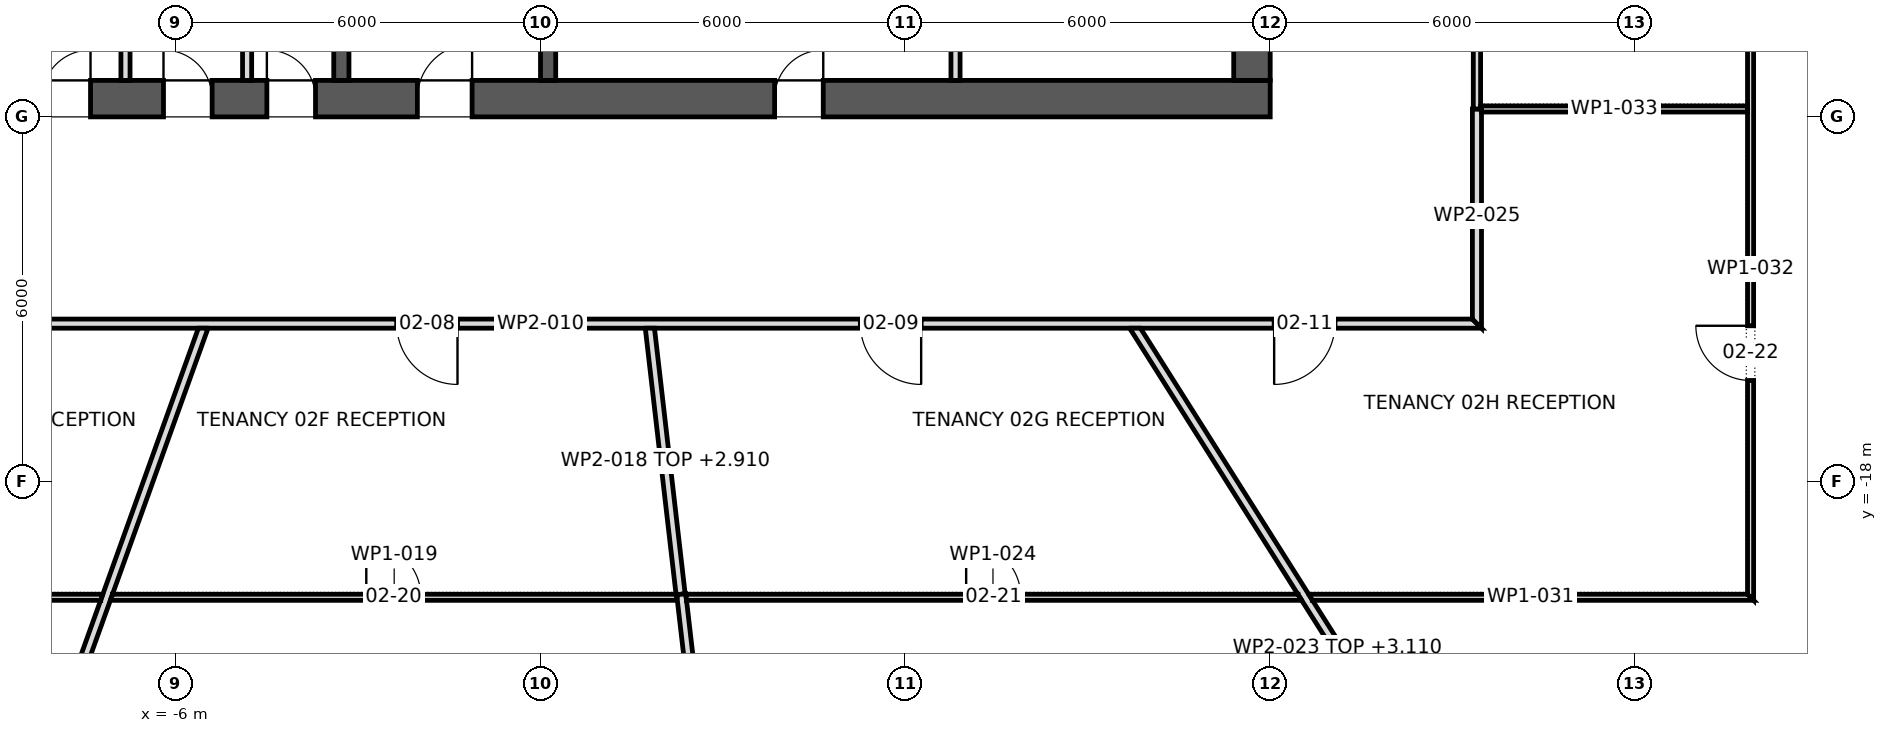
"""IFC4 building model, lengths in metres.
Left out: names, types, materials, properties, quantities, classifications, styles, units other than length and angle.
Written with IfcOpenShell. Run it as: python <this file> out.ifc"""

import sys

from ifc_helpers import new_model, si_unit, direction, frame, frame_2d, origin, place, context, subcontext, project, spatial, polyline, rectangle, outline, extrude, element, fill, save


model = new_model("IFC4")
c1 = context("Model", 3, precision=1e-05, world=origin(), true_north=direction((0.0, 1.0)))
c2 = subcontext(c1, "Body", "Model", "MODEL_VIEW")
j1 = project(units=[si_unit("LENGTHUNIT", "METRE"), si_unit("PLANEANGLEUNIT", "RADIAN")], contexts=[c1])
p1 = place(None, origin())
s1 = spatial("IfcSite", under=j1, at=p1, CompositionType="ELEMENT")
p2 = place(p1, origin())
s2 = spatial("IfcBuilding", under=s1, at=p2, CompositionType="ELEMENT")
p3 = place(p2, frame((0.0, 0.0, 36.1)))
s3 = spatial("IfcBuildingStorey", under=s2, at=p3, CompositionType="ELEMENT", Elevation=36.1)
p4 = place(p3, frame((-12.0, -11.7, 0.0), z_axis=(0.0, 0.0, 1.0), x_axis=(1.0, 0.0, 0.0)))
e1 = element("IfcWall", 1, at=p4, inside=s3, PredefinedType="SHEAR", context=c2, shape_type="SweptSolid", body=[
    extrude(rectangle(XDim=24.0, YDim=0.6, at=frame_2d((12.0, 0.0))), origin(), (0.0, 0.0, 1.0), 4.2),
])
p5 = place(p4, frame((9.975, 0.0, 0.0)))
e2 = element("IfcOpeningElement", 2, at=p5, cuts=e1, PredefinedType="OPENING", context=c2, shape_type="SweptSolid", body=[
    extrude(rectangle(XDim=0.9, YDim=2.1, at=frame_2d((0.45, 1.05))), frame((0.0, 0.312, 0.0), z_axis=(0.0, -1.0, 0.0), x_axis=(1.0, 0.0, 0.0)), (0.0, 0.0, 1.0), 0.624),
])
p6 = place(p4, frame((3.8, 0.0, 0.0)))
e3 = element("IfcOpeningElement", 3, at=p6, cuts=e1, PredefinedType="OPENING", context=c2, shape_type="SweptSolid", body=[
    extrude(rectangle(XDim=0.8, YDim=2.1, at=frame_2d((0.4, 1.05))), frame((0.0, 0.312, 0.0), z_axis=(0.0, -1.0, 0.0), x_axis=(1.0, 0.0, 0.0)), (0.0, 0.0, 1.0), 0.624),
])
p7 = place(p4, frame((5.8, 0.0, 0.0)))
e4 = element("IfcOpeningElement", 4, at=p7, cuts=e1, PredefinedType="OPENING", context=c2, shape_type="SweptSolid", body=[
    extrude(rectangle(XDim=0.8, YDim=2.1, at=frame_2d((0.4, 1.05))), frame((0.0, 0.312, 0.0), z_axis=(0.0, -1.0, 0.0), x_axis=(1.0, 0.0, 0.0)), (0.0, 0.0, 1.0), 0.624),
])
p8 = place(p4, frame((7.5, 0.0, 0.0)))
e5 = element("IfcOpeningElement", 5, at=p8, cuts=e1, PredefinedType="OPENING", context=c2, shape_type="SweptSolid", body=[
    extrude(rectangle(XDim=0.8, YDim=2.1, at=frame_2d((0.4, 1.05))), frame((0.0, 0.312, 0.0), z_axis=(0.0, -1.0, 0.0), x_axis=(1.0, 0.0, 0.0)), (0.0, 0.0, 1.0), 0.624),
])
p9 = place(p4, frame((15.85, 0.0, 0.0)))
e6 = element("IfcOpeningElement", 6, at=p9, cuts=e1, PredefinedType="OPENING", context=c2, shape_type="SweptSolid", body=[
    extrude(rectangle(XDim=0.8, YDim=2.1, at=frame_2d((0.4, 1.05))), frame((0.0, 0.312, 0.0), z_axis=(0.0, -1.0, 0.0), x_axis=(1.0, 0.0, 0.0)), (0.0, 0.0, 1.0), 0.624),
])
p10 = place(p3, frame((11.7, -11.4, 0.0), z_axis=(0.0, 0.0, 1.0), x_axis=(0.0, 1.0, 0.0)))
e7 = element("IfcWall", 7, at=p10, inside=s3, PredefinedType="SHEAR", context=c2, shape_type="SweptSolid", body=[
    extrude(rectangle(XDim=22.8, YDim=0.6, at=frame_2d((11.4, 0.0))), origin(), (0.0, 0.0, 1.0), 4.2),
])
p11 = place(p10, frame((10.2, 0.0, 0.0)))
e8 = element("IfcOpeningElement", 8, at=p11, cuts=e7, PredefinedType="OPENING", context=c2, shape_type="SweptSolid", body=[
    extrude(rectangle(XDim=2.4, YDim=2.1, at=frame_2d((1.2, 1.05))), frame((0.0, 0.312, 0.0), z_axis=(0.0, -1.0, 0.0), x_axis=(1.0, 0.0, 0.0)), (0.0, 0.0, 1.0), 0.624),
])
p12 = place(p10, frame((19.5, 0.0, 0.0)))
e9 = element("IfcOpeningElement", 9, at=p12, cuts=e7, PredefinedType="OPENING", context=c2, shape_type="SweptSolid", body=[
    extrude(rectangle(XDim=1.2, YDim=2.1, at=frame_2d((0.6, 1.05))), frame((0.0, 0.312, 0.0), z_axis=(0.0, -1.0, 0.0), x_axis=(1.0, 0.0, 0.0)), (0.0, 0.0, 1.0), 0.624),
])
p13 = place(p10, frame((2.1, 0.0, 0.0)))
e10 = element("IfcOpeningElement", 10, at=p13, cuts=e7, PredefinedType="OPENING", context=c2, shape_type="SweptSolid", body=[
    extrude(rectangle(XDim=1.2, YDim=2.1, at=frame_2d((0.6, 1.05))), frame((0.0, 0.312, 0.0), z_axis=(0.0, -1.0, 0.0), x_axis=(1.0, 0.0, 0.0)), (0.0, 0.0, 1.0), 0.624),
])
for number, where, z_axis, x_axis in (
    (11, (-3.275, -11.4, 0.0), (0.0, 0.0, 1.0), (0.0, 1.0, 0.0)),
    (12, (0.125, -11.4, 0.0), (0.0, 0.0, 1.0), (0.0, 1.0, 0.0)),
):
    element("IfcWall", number, at=place(p3, frame(where, z_axis=z_axis, x_axis=x_axis)), inside=s3, PredefinedType="SHEAR", context=c2, shape_type="SweptSolid", body=[
        extrude(rectangle(XDim=4.9, YDim=0.25, at=frame_2d((2.45, 0.0))), origin(), (0.0, 0.0, 1.0), 3.9),
    ])
for number, where, z_axis, x_axis in (
    (13, (-6.825, -11.4, 0.0), (0.0, 0.0, 1.0), (0.0, 1.0, 0.0)),
    (14, (-4.825, -11.4, 0.0), (0.0, 0.0, 1.0), (0.0, 1.0, 0.0)),
    (15, (6.825, -11.4, 0.0), (0.0, 0.0, 1.0), (0.0, 1.0, 0.0)),
):
    element("IfcWall", number, at=place(p3, frame(where, z_axis=z_axis, x_axis=x_axis)), inside=s3, PredefinedType="PARTITIONING", context=c2, shape_type="SweptSolid", body=[
        extrude(rectangle(XDim=1.5, YDim=0.15, at=frame_2d((0.75, 0.0))), origin(), (0.0, 0.0, 1.0), 3.9),
    ])
p14 = place(p3, frame((-15.475, -15.4, 0.0), z_axis=(0.0, 0.0, 1.0), x_axis=(1.0, 0.0, 0.0)))
e16 = element("IfcWall", 16, at=p14, inside=s3, PredefinedType="PARTITIONING", context=c2, shape_type="SweptSolid", body=[
    extrude(outline(polyline([(0.0, -0.075), (1.935, -0.075), (3.869, -0.075), (5.803, -0.075), (7.738, -0.075), (9.672, -0.075), (11.606, -0.075), (13.541, -0.075), (15.475, -0.075), (17.409, -0.075), (19.344, -0.075), (21.278, -0.075), (23.212, -0.075), (25.147, -0.075), (27.081, -0.075), (29.016, -0.075), (30.95, -0.075), (30.8, 0.075), (28.885, 0.075), (26.969, 0.075), (25.053, 0.075), (23.138, 0.075), (21.222, 0.075), (19.306, 0.075), (17.391, 0.075), (15.475, 0.075), (13.56, 0.075), (11.644, 0.075), (9.728, 0.075), (7.812, 0.075), (5.897, 0.075), (3.981, 0.075), (2.066, 0.075), (0.15, 0.075), (0.0, -0.075)])), origin(), (0.0, 0.0, 1.0), 3.9),
])
p15 = place(p14, frame((4.745, 0.0, 0.0)))
e17 = element("IfcOpeningElement", 17, at=p15, cuts=e16, PredefinedType="OPENING", context=c2, shape_type="SweptSolid", body=[
    extrude(rectangle(XDim=1.0, YDim=2.1, at=frame_2d((0.5, 1.05))), frame((0.0, 0.087, 0.0), z_axis=(0.0, -1.0, 0.0), x_axis=(1.0, 0.0, 0.0)), (0.0, 0.0, 1.0), 0.174),
])
p16 = place(p14, frame((13.11, 0.0, 0.0)))
e18 = element("IfcOpeningElement", 18, at=p16, cuts=e16, PredefinedType="OPENING", context=c2, shape_type="SweptSolid", body=[
    extrude(rectangle(XDim=1.0, YDim=2.1, at=frame_2d((0.5, 1.05))), frame((0.0, 0.087, 0.0), z_axis=(0.0, -1.0, 0.0), x_axis=(1.0, 0.0, 0.0)), (0.0, 0.0, 1.0), 0.174),
])
p17 = place(p14, frame((20.735, 0.0, 0.0)))
e19 = element("IfcOpeningElement", 19, at=p17, cuts=e16, PredefinedType="OPENING", context=c2, shape_type="SweptSolid", body=[
    extrude(rectangle(XDim=1.0, YDim=2.1, at=frame_2d((0.5, 1.05))), frame((0.0, 0.087, 0.0), z_axis=(0.0, -1.0, 0.0), x_axis=(1.0, 0.0, 0.0)), (0.0, 0.0, 1.0), 0.174),
])
p18 = place(p14, frame((27.54, 0.0, 0.0)))
e20 = element("IfcOpeningElement", 20, at=p18, cuts=e16, PredefinedType="OPENING", context=c2, shape_type="SweptSolid", body=[
    extrude(rectangle(XDim=1.0, YDim=2.1, at=frame_2d((0.5, 1.05))), frame((0.0, 0.087, 0.0), z_axis=(0.0, -1.0, 0.0), x_axis=(1.0, 0.0, 0.0)), (0.0, 0.0, 1.0), 0.174),
])
p19 = place(p3, frame((-10.119, -28.209, 0.0), z_axis=(0.0, 0.0, 1.0), x_axis=(0.337949016046, 0.941164418448, 0.0)))
e21 = element("IfcWall", 21, at=p19, inside=s3, PredefinedType="PARTITIONING", context=c2, shape_type="SweptSolid", body=[
    extrude(outline(polyline([(0.014, -0.075), (1.792, -0.075), (3.57, -0.075), (5.347, -0.075), (7.125, -0.075), (8.903, -0.075), (8.908, -0.073), (8.909, -0.075), (10.458, -0.075), (12.008, -0.075), (13.557, -0.075), (13.557, -0.074), (13.555, -0.069), (13.555, -0.069), (13.503, 0.075), (11.919, 0.075), (10.335, 0.075), (8.751, 0.075), (8.749, 0.074), (8.749, 0.075), (6.999, 0.075), (5.249, 0.075), (3.5, 0.075), (1.75, 0.075), (0.0, 0.075), (0.0, 0.071), (0.0, -0.0), (0.014, -0.075)])), origin(), (0.0, 0.0, 1.0), 2.91),
])
p20 = place(p3, frame((-7.198, -19.9, 0.0), z_axis=(0.0, 0.0, 1.0), x_axis=(-1.0, 0.0, 0.0)))
e22 = element("IfcWall", 22, at=p20, inside=s3, PredefinedType="PARTITIONING", context=c2, shape_type="SweptSolid", body=[
    extrude(outline(polyline([(0.0, -0.05), (1.993, -0.05), (3.986, -0.05), (5.979, -0.05), (7.972, -0.05), (9.965, -0.05), (11.958, -0.05), (12.055, 0.05), (12.055, 0.05), (10.338, 0.05), (8.621, 0.05), (6.904, 0.05), (5.187, 0.05), (3.47, 0.05), (1.753, 0.05), (0.035, 0.05), (0.0, -0.049), (0.0, -0.05)])), origin(), (0.0, 0.0, 1.0), 3.9),
])
p21 = place(p20, frame((5.577, 0.0, 0.0)))
e23 = element("IfcOpeningElement", 23, at=p21, cuts=e22, PredefinedType="OPENING", context=c2, shape_type="SweptSolid", body=[
    extrude(rectangle(XDim=0.9, YDim=2.1, at=frame_2d((0.45, 1.05))), frame((0.0, 0.062, 0.0), z_axis=(0.0, -1.0, 0.0), x_axis=(1.0, 0.0, 0.0)), (0.0, 0.0, 1.0), 0.124),
])
p22 = place(p3, frame((1.798, -15.467, 0.0), z_axis=(0.0, 0.0, 1.0), x_axis=(0.114783679138, -0.993390510828, 0.0)))
e24 = element("IfcWall", 24, at=p22, inside=s3, PredefinedType="PARTITIONING", context=c2, shape_type="SweptSolid", body=[
    extrude(outline(polyline([(0.0, -0.075), (1.468, -0.075), (2.936, -0.075), (4.404, -0.075), (4.404, -0.075), (4.407, -0.075), (4.413, -0.075), (4.413, 0.075), (2.948, 0.075), (1.483, 0.075), (0.017, 0.075), (0.0, -0.073), (0.0, -0.075)])), origin(), (0.0, 0.0, 1.0), 2.91),
])
p23 = place(p3, frame((2.25, -19.9, 0.0), z_axis=(0.0, 0.0, 1.0), x_axis=(-1.0, 0.0, 0.0)))
e25 = element("IfcWall", 25, at=p23, inside=s3, PredefinedType="PARTITIONING", context=c2, shape_type="SweptSolid", body=[
    extrude(outline(polyline([(0.021, -0.05), (1.875, -0.05), (3.728, -0.05), (5.581, -0.05), (7.435, -0.05), (9.288, -0.05), (9.324, 0.05), (9.324, 0.05), (7.459, 0.05), (5.594, 0.05), (3.729, 0.05), (1.865, 0.05), (0.0, 0.05), (0.0, 0.047), (0.01, -0.041), (0.0, -0.042), (0.0, -0.043), (0.02, -0.041), (0.021, -0.05)])), origin(), (0.0, 0.0, 1.0), 3.9),
])
p24 = place(p23, frame((4.215, 0.0, 0.0)))
e26 = element("IfcOpeningElement", 26, at=p24, cuts=e25, PredefinedType="OPENING", context=c2, shape_type="SweptSolid", body=[
    extrude(rectangle(XDim=0.9, YDim=2.1, at=frame_2d((0.45, 1.05))), frame((0.0, 0.062, 0.0), z_axis=(0.0, -1.0, 0.0), x_axis=(1.0, 0.0, 0.0)), (0.0, 0.0, 1.0), 0.124),
])
p25 = place(p3, frame((2.314, -19.85, 0.0), z_axis=(0.0, 0.0, 1.0), x_axis=(0.115247328534, -0.9933368277, 0.0)))
e27 = element("IfcWall", 27, at=p25, inside=s3, PredefinedType="PARTITIONING", context=c2, shape_type="SweptSolid", body=[
    extrude(outline(polyline([(0.089, -0.075), (1.979, -0.075), (3.87, -0.075), (5.76, -0.075), (7.65, -0.075), (9.541, -0.075), (9.546, -0.034), (9.546, 0.075), (7.658, 0.075), (5.771, 0.075), (3.884, 0.075), (1.996, 0.075), (0.109, 0.075), (0.109, 0.074), (0.098, 0.075), (0.0, 0.075), (0.0, -0.065), (0.089, -0.075)])), origin(), (0.0, 0.0, 1.0), 2.91),
])
p26 = place(p3, frame((9.752, -15.435, 0.0), z_axis=(0.0, 0.0, 1.0), x_axis=(0.534413972524, -0.845222873549, 0.0)))
e28 = element("IfcWall", 28, at=p26, inside=s3, PredefinedType="PARTITIONING", context=c2, shape_type="SweptSolid", body=[
    extrude(outline(polyline([(0.0, -0.075), (1.725, -0.075), (3.451, -0.075), (5.176, -0.075), (5.177, -0.073), (5.181, -0.075), (7.005, -0.075), (8.83, -0.075), (10.655, -0.075), (12.48, -0.075), (12.497, 0.001), (12.5, 0.064), (12.5, 0.075), (10.723, 0.075), (8.945, 0.075), (7.167, 0.075), (5.389, 0.075), (5.387, 0.072), (5.383, 0.075), (3.62, 0.075), (1.858, 0.075), (0.095, 0.075), (0.0, -0.075), (0.0, -0.075)])), origin(), (0.0, 0.0, 1.0), 3.11),
])
p27 = place(p3, frame((12.518, -19.9, 0.0), z_axis=(0.0, 0.0, 1.0), x_axis=(-1.0, 0.0, 0.0)))
e29 = element("IfcWall", 29, at=p27, inside=s3, PredefinedType="PARTITIONING", context=c2, shape_type="SweptSolid", body=[
    extrude(outline(polyline([(10.128, -0.05), (10.128, -0.048), (10.117, 0.05), (8.431, 0.05), (6.745, 0.05), (5.058, 0.05), (3.372, 0.05), (1.686, 0.05), (0.0, 0.05), (0.0, 0.05), (0.063, -0.05), (1.741, -0.05), (3.418, -0.05), (5.096, -0.05), (6.773, -0.05), (8.451, -0.05), (10.128, -0.05)])), origin(), (0.0, 0.0, 1.0), 3.9),
])
p28 = place(p27, frame((4.618, 0.0, 0.0)))
e30 = element("IfcOpeningElement", 30, at=p28, cuts=e29, PredefinedType="OPENING", context=c2, shape_type="SweptSolid", body=[
    extrude(rectangle(XDim=0.9, YDim=2.1, at=frame_2d((0.45, 1.05))), frame((0.0, 0.062, 0.0), z_axis=(0.0, -1.0, 0.0), x_axis=(1.0, 0.0, 0.0)), (0.0, 0.0, 1.0), 0.124),
])
p29 = place(p3, frame((15.4, -11.87, 0.0), z_axis=(0.0, 0.0, 1.0), x_axis=(0.0, -1.0, 0.0)))
e31 = element("IfcWall", 31, at=p29, inside=s3, PredefinedType="PARTITIONING", context=c2, shape_type="SweptSolid", body=[
    extrude(outline(polyline([(0.0, -0.075), (1.728, -0.075), (3.455, -0.075), (3.605, 0.075), (1.802, 0.075), (0.0, 0.075), (0.0, -0.075)])), origin(), (0.0, 0.0, 1.0), 3.9),
])
p30 = place(p3, frame((15.4, -6.96, 0.0), z_axis=(0.0, 0.0, 1.0), x_axis=(0.0, -1.0, 0.0)))
e32 = element("IfcWall", 32, at=p30, inside=s3, PredefinedType="PARTITIONING", context=c2, shape_type="SweptSolid", body=[
    extrude(rectangle(XDim=4.91, YDim=0.12, at=frame_2d((2.455, 0.0))), origin(), (0.0, 0.0, 1.0), 3.9),
])
p31 = place(p30, frame((1.955, 0.0, 0.0)))
e33 = element("IfcOpeningElement", 33, at=p31, cuts=e32, PredefinedType="OPENING", context=c2, shape_type="SweptSolid", body=[
    extrude(rectangle(XDim=1.0, YDim=2.1, at=frame_2d((0.5, 1.05))), frame((0.0, 0.072, 0.0), z_axis=(0.0, -1.0, 0.0), x_axis=(1.0, 0.0, 0.0)), (0.0, 0.0, 1.0), 0.144),
])
p32 = place(p3, frame((19.95, -19.9, 0.0), z_axis=(0.0, 0.0, 1.0), x_axis=(-1.0, 0.0, 0.0)))
e34 = element("IfcWall", 34, at=p32, inside=s3, PredefinedType="PARTITIONING", context=c2, shape_type="SweptSolid", body=[
    extrude(outline(polyline([(7.317, -0.05), (7.317, -0.05), (7.254, 0.05), (5.441, 0.05), (3.627, 0.05), (1.813, 0.05), (0.0, 0.05), (0.1, -0.05), (0.1, -0.05), (1.904, -0.05), (3.709, -0.05), (5.513, -0.05), (7.317, -0.05)])), origin(), (0.0, 0.0, 1.0), 3.9),
])
p33 = place(p3, frame((19.9, -19.95, 0.0), z_axis=(0.0, 0.0, 1.0), x_axis=(0.0, 1.0, 0.0)))
e35 = element("IfcWall", 35, at=p33, inside=s3, PredefinedType="PARTITIONING", context=c2, shape_type="SweptSolid", body=[
    extrude(outline(polyline([(10.846, 0.05), (9.055, 0.05), (7.264, 0.05), (5.473, 0.05), (3.682, 0.05), (1.891, 0.05), (0.1, 0.05), (0.0, -0.05), (1.808, -0.05), (3.615, -0.05), (5.423, -0.05), (7.231, -0.05), (9.039, -0.05), (10.846, -0.05), (10.846, 0.05)])), origin(), (0.0, 0.0, 1.0), 3.9),
])
p34 = place(p33, frame((3.615, 0.0, 0.0)))
e36 = element("IfcOpeningElement", 36, at=p34, cuts=e35, PredefinedType="OPENING", context=c2, shape_type="SweptSolid", body=[
    extrude(rectangle(XDim=0.9, YDim=2.1, at=frame_2d((0.45, 1.05))), frame((0.0, 0.062, 0.0), z_axis=(0.0, -1.0, 0.0), x_axis=(1.0, 0.0, 0.0)), (0.0, 0.0, 1.0), 0.124),
])
p35 = place(p3, frame((19.85, -11.87, 0.0), z_axis=(0.0, 0.0, 1.0), x_axis=(-1.0, 0.0, 0.0)))
e37 = element("IfcWall", 37, at=p35, inside=s3, PredefinedType="PARTITIONING", context=c2, shape_type="SweptSolid", body=[
    extrude(outline(polyline([(4.39, -0.05), (4.39, 0.0), (4.375, 0.0), (4.375, 0.05), (2.917, 0.05), (1.458, 0.05), (0.0, 0.05), (0.0, -0.05), (1.463, -0.05), (2.927, -0.05), (4.39, -0.05)])), origin(), (0.0, 0.0, 1.0), 3.9),
])
p36 = place(p3, frame((19.937, -9.017, 0.0), z_axis=(0.0, 0.0, 1.0), x_axis=(0.911435859514, -0.411442187909, 0.0)))
e38 = element("IfcWall", 38, at=p36, inside=s3, PredefinedType="PARTITIONING", context=c2, shape_type="SweptSolid", body=[
    extrude(outline(polyline([(0.0, -0.075), (0.045, -0.075), (0.048, -0.074), (0.049, -0.075), (2.013, -0.075), (3.978, -0.075), (5.943, -0.075), (7.908, -0.075), (9.873, -0.075), (11.838, -0.075), (11.856, -0.001), (11.858, 0.069), (11.858, 0.075), (9.882, 0.075), (7.906, 0.075), (5.929, 0.075), (3.953, 0.075), (1.976, 0.075), (0.0, 0.075), (0.0, -0.075)])), origin(), (0.0, 0.0, 1.0), 2.91),
])
p37 = place(p5, origin())
e39 = element("IfcDoor", 39, at=p37, inside=s3, OperationType="SINGLE_SWING_LEFT", PredefinedType="DOOR", context=c2, shape_type="SweptSolid", body=[
    extrude(rectangle(XDim=0.9, YDim=2.1, at=frame_2d((0.45, 1.05))), frame((0.0, 0.025, 0.0), z_axis=(0.0, -1.0, 0.0), x_axis=(1.0, 0.0, 0.0)), (0.0, 0.0, 1.0), 0.05),
])
fill(e2, e39)
p38 = place(p6, origin())
e40 = element("IfcDoor", 40, at=p38, inside=s3, OperationType="SINGLE_SWING_LEFT", PredefinedType="DOOR", context=c2, shape_type="SweptSolid", body=[
    extrude(rectangle(XDim=0.8, YDim=2.1, at=frame_2d((0.4, 1.05))), frame((0.0, 0.025, 0.0), z_axis=(0.0, -1.0, 0.0), x_axis=(1.0, 0.0, 0.0)), (0.0, 0.0, 1.0), 0.05),
])
fill(e3, e40)
p39 = place(p7, origin())
e41 = element("IfcDoor", 41, at=p39, inside=s3, OperationType="SINGLE_SWING_RIGHT", PredefinedType="DOOR", context=c2, shape_type="SweptSolid", body=[
    extrude(rectangle(XDim=0.8, YDim=2.1, at=frame_2d((0.4, 1.05))), frame((0.0, 0.025, 0.0), z_axis=(0.0, -1.0, 0.0), x_axis=(1.0, 0.0, 0.0)), (0.0, 0.0, 1.0), 0.05),
])
fill(e4, e41)
p40 = place(p8, origin())
e42 = element("IfcDoor", 42, at=p40, inside=s3, OperationType="SINGLE_SWING_RIGHT", PredefinedType="DOOR", context=c2, shape_type="SweptSolid", body=[
    extrude(rectangle(XDim=0.8, YDim=2.1, at=frame_2d((0.4, 1.05))), frame((0.0, 0.025, 0.0), z_axis=(0.0, -1.0, 0.0), x_axis=(1.0, 0.0, 0.0)), (0.0, 0.0, 1.0), 0.05),
])
fill(e5, e42)
p41 = place(p9, origin())
e43 = element("IfcDoor", 43, at=p41, inside=s3, OperationType="SINGLE_SWING_LEFT", PredefinedType="DOOR", context=c2, shape_type="SweptSolid", body=[
    extrude(rectangle(XDim=0.8, YDim=2.1, at=frame_2d((0.4, 1.05))), frame((0.0, 0.025, 0.0), z_axis=(0.0, -1.0, 0.0), x_axis=(1.0, 0.0, 0.0)), (0.0, 0.0, 1.0), 0.05),
])
fill(e6, e43)
p42 = place(p16, frame((1.0, 0.0, 0.0), z_axis=(0.0, 0.0, 1.0), x_axis=(-1.0, 0.0, 0.0)))
e44 = element("IfcDoor", 44, at=p42, inside=s3, OperationType="SINGLE_SWING_RIGHT", PredefinedType="DOOR", context=c2, shape_type="SweptSolid", body=[
    extrude(rectangle(XDim=1.0, YDim=2.1, at=frame_2d((0.5, 1.05))), frame((0.0, 0.025, 0.0), z_axis=(0.0, -1.0, 0.0), x_axis=(1.0, 0.0, 0.0)), (0.0, 0.0, 1.0), 0.05),
])
fill(e18, e44)
p43 = place(p17, frame((1.0, 0.0, 0.0), z_axis=(0.0, 0.0, 1.0), x_axis=(-1.0, 0.0, 0.0)))
e45 = element("IfcDoor", 45, at=p43, inside=s3, OperationType="SINGLE_SWING_RIGHT", PredefinedType="DOOR", context=c2, shape_type="SweptSolid", body=[
    extrude(rectangle(XDim=1.0, YDim=2.1, at=frame_2d((0.5, 1.05))), frame((0.0, 0.025, 0.0), z_axis=(0.0, -1.0, 0.0), x_axis=(1.0, 0.0, 0.0)), (0.0, 0.0, 1.0), 0.05),
])
fill(e19, e45)
p44 = place(p18, frame((1.0, 0.0, 0.0), z_axis=(0.0, 0.0, 1.0), x_axis=(-1.0, 0.0, 0.0)))
e46 = element("IfcDoor", 46, at=p44, inside=s3, OperationType="SINGLE_SWING_LEFT", PredefinedType="DOOR", context=c2, shape_type="SweptSolid", body=[
    extrude(rectangle(XDim=1.0, YDim=2.1, at=frame_2d((0.5, 1.05))), frame((0.0, 0.025, 0.0), z_axis=(0.0, -1.0, 0.0), x_axis=(1.0, 0.0, 0.0)), (0.0, 0.0, 1.0), 0.05),
])
fill(e20, e46)
p45 = place(p24, frame((0.9, 0.0, 0.0), z_axis=(0.0, 0.0, 1.0), x_axis=(-1.0, 0.0, 0.0)))
e47 = element("IfcDoor", 47, at=p45, inside=s3, OperationType="SINGLE_SWING_RIGHT", PredefinedType="DOOR", context=c2, shape_type="SweptSolid", body=[
    extrude(rectangle(XDim=0.9, YDim=2.1, at=frame_2d((0.45, 1.05))), frame((0.0, 0.025, 0.0), z_axis=(0.0, -1.0, 0.0), x_axis=(1.0, 0.0, 0.0)), (0.0, 0.0, 1.0), 0.05),
])
fill(e26, e47)
p46 = place(p28, frame((0.9, 0.0, 0.0), z_axis=(0.0, 0.0, 1.0), x_axis=(-1.0, 0.0, 0.0)))
e48 = element("IfcDoor", 48, at=p46, inside=s3, OperationType="SINGLE_SWING_RIGHT", PredefinedType="DOOR", context=c2, shape_type="SweptSolid", body=[
    extrude(rectangle(XDim=0.9, YDim=2.1, at=frame_2d((0.45, 1.05))), frame((0.0, 0.025, 0.0), z_axis=(0.0, -1.0, 0.0), x_axis=(1.0, 0.0, 0.0)), (0.0, 0.0, 1.0), 0.05),
])
fill(e30, e48)
p47 = place(p34, origin())
e49 = element("IfcDoor", 49, at=p47, inside=s3, OperationType="SINGLE_SWING_LEFT", PredefinedType="DOOR", context=c2, shape_type="SweptSolid", body=[
    extrude(rectangle(XDim=0.9, YDim=2.1, at=frame_2d((0.45, 1.05))), frame((0.0, 0.025, 0.0), z_axis=(0.0, -1.0, 0.0), x_axis=(1.0, 0.0, 0.0)), (0.0, 0.0, 1.0), 0.05),
])
fill(e36, e49)
save(model, sys.argv[1])
